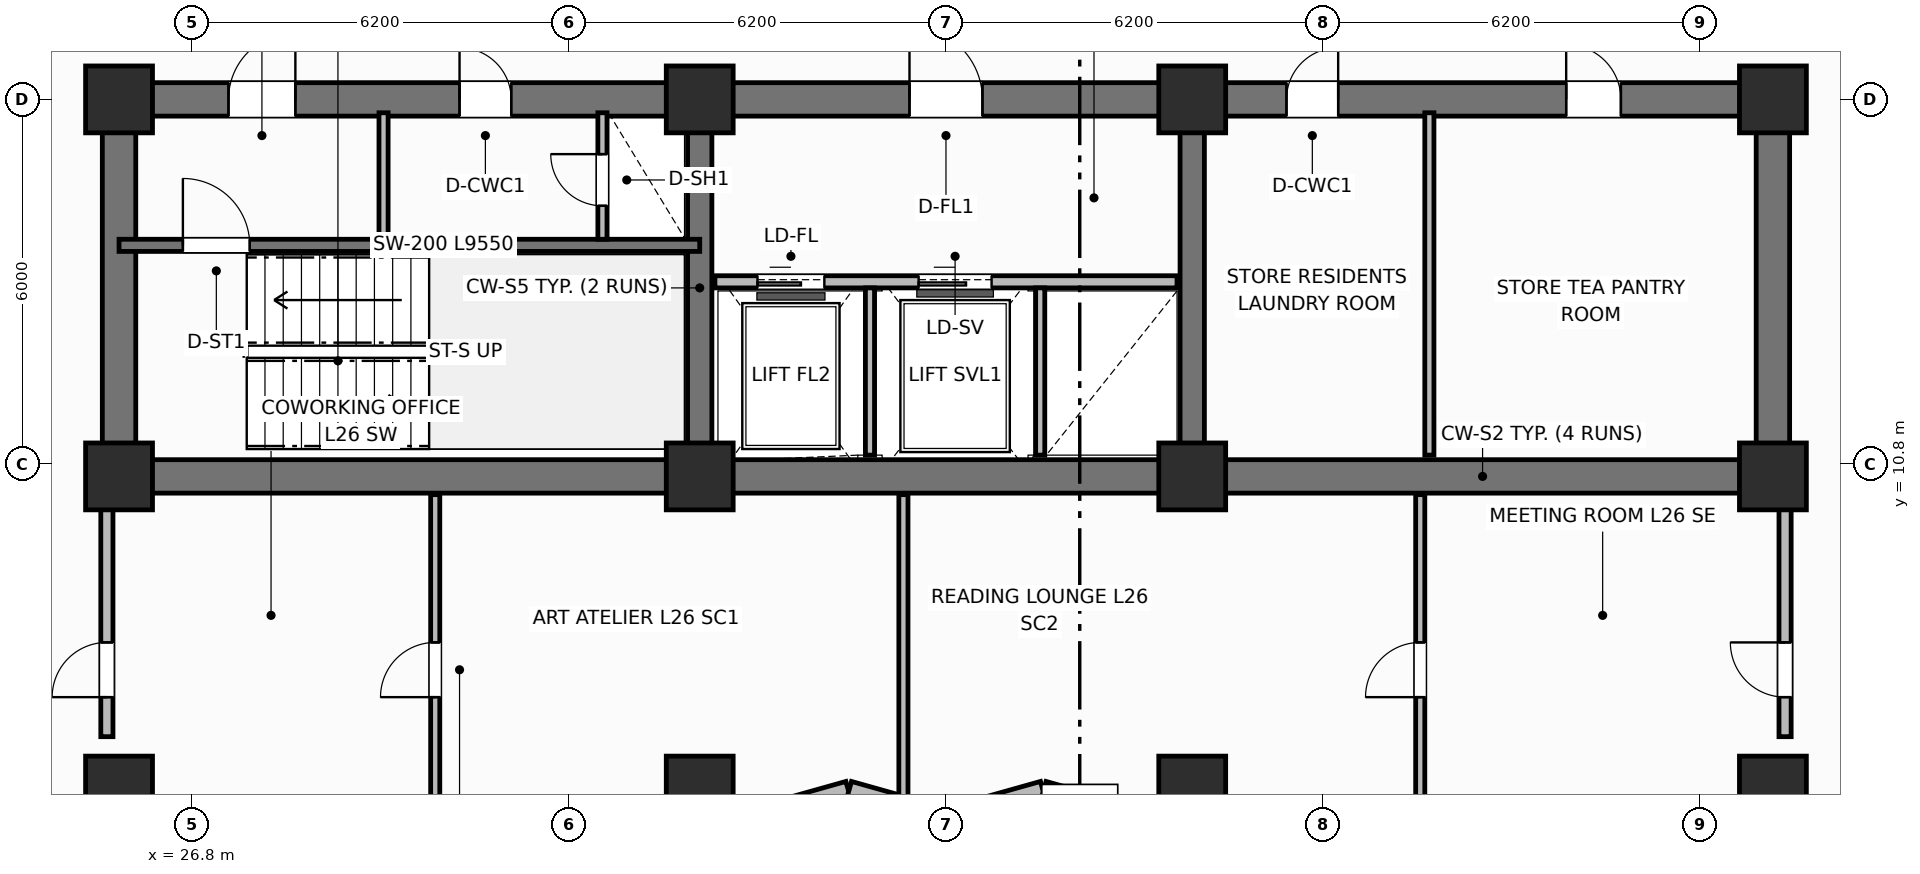
"""IFC4 building model, lengths in metres.
Left out: names, types, materials, properties, quantities, classifications, styles, units other than length and angle.
Written with IfcOpenShell. Run it as: python <this file> out.ifc"""

import sys

from ifc_helpers import new_model, si_unit, direction, frame, frame_2d, origin, origin_2d, place, context, subcontext, project, spatial, rectangle, extrude, element, fill, save


model = new_model("IFC4")
c1 = context("Model", 3, precision=1e-05, world=origin(), true_north=direction((0.0, 1.0)))
c2 = subcontext(c1, "Body", "Model", "MODEL_VIEW")
j1 = project(units=[si_unit("LENGTHUNIT", "METRE"), si_unit("PLANEANGLEUNIT", "RADIAN")], contexts=[c1])
p1 = place(None, origin())
s1 = spatial("IfcSite", under=j1, at=p1, CompositionType="ELEMENT")
p2 = place(p1, origin())
s2 = spatial("IfcBuilding", under=s1, at=p2, CompositionType="ELEMENT")
p3 = place(p2, frame((0.0, 0.0, 106.8)))
s3 = spatial("IfcBuildingStorey", under=s2, at=p3, CompositionType="ELEMENT", Elevation=106.8)
p4 = place(p3, frame((52.8, 10.6, 0.0), z_axis=(0.0, 0.0, 1.0), x_axis=(-1.0, 0.0, 0.0)))
e1 = element("IfcWall", 1, at=p4, inside=s3, PredefinedType="SHEAR", context=c2, shape_type="SweptSolid", body=[
    extrude(rectangle(XDim=27.2, YDim=0.55, at=frame_2d((13.6, 0.0))), origin(), (0.0, 0.0, 1.0), 3.7),
])
for number, where, z_axis, x_axis in (
    (2, (25.6, 10.875, 0.0), (0.0, 0.0, 1.0), (0.0, 1.0, 0.0)),
    (3, (52.8, 10.875, 0.0), (0.0, 0.0, 1.0), (0.0, 1.0, 0.0)),
):
    element("IfcWall", number, at=place(p3, frame(where, z_axis=z_axis, x_axis=x_axis)), inside=s3, PredefinedType="SHEAR", context=c2, shape_type="SweptSolid", body=[
        extrude(rectangle(XDim=5.65, YDim=0.55, at=frame_2d((2.825, 0.0))), origin(), (0.0, 0.0, 1.0), 3.7),
    ])
p5 = place(p3, frame((25.6, 16.8, 0.0), z_axis=(0.0, 0.0, 1.0), x_axis=(1.0, 0.0, 0.0)))
e4 = element("IfcWall", 4, at=p5, inside=s3, PredefinedType="SHEAR", context=c2, shape_type="SweptSolid", body=[
    extrude(rectangle(XDim=27.2, YDim=0.55, at=frame_2d((13.6, 0.0))), origin(), (0.0, 0.0, 1.0), 3.7),
])
p6 = place(p5, frame((1.8, 0.0, 0.0)))
e5 = element("IfcOpeningElement", 5, at=p6, cuts=e4, PredefinedType="OPENING", context=c2, shape_type="SweptSolid", body=[
    extrude(rectangle(XDim=1.1, YDim=2.15, at=frame_2d((0.55, 1.075))), frame((0.0, 0.285, 0.0), z_axis=(0.0, -1.0, 0.0), x_axis=(1.0, 0.0, 0.0)), (0.0, 0.0, 1.0), 0.57),
])
p7 = place(p5, frame((5.6, 0.0, 0.0)))
e6 = element("IfcOpeningElement", 6, at=p7, cuts=e4, PredefinedType="OPENING", context=c2, shape_type="SweptSolid", body=[
    extrude(rectangle(XDim=0.85, YDim=2.1, at=frame_2d((0.425, 1.05))), frame((0.0, 0.285, 0.0), z_axis=(0.0, -1.0, 0.0), x_axis=(1.0, 0.0, 0.0)), (0.0, 0.0, 1.0), 0.57),
])
p8 = place(p5, frame((13.0, 0.0, 0.0)))
e7 = element("IfcOpeningElement", 7, at=p8, cuts=e4, PredefinedType="OPENING", context=c2, shape_type="SweptSolid", body=[
    extrude(rectangle(XDim=1.2, YDim=2.15, at=frame_2d((0.6, 1.075))), frame((0.0, 0.285, 0.0), z_axis=(0.0, -1.0, 0.0), x_axis=(1.0, 0.0, 0.0)), (0.0, 0.0, 1.0), 0.57),
])
p9 = place(p5, frame((19.2, 0.0, 0.0)))
e8 = element("IfcOpeningElement", 8, at=p9, cuts=e4, PredefinedType="OPENING", context=c2, shape_type="SweptSolid", body=[
    extrude(rectangle(XDim=0.85, YDim=2.1, at=frame_2d((0.425, 1.05))), frame((0.0, 0.285, 0.0), z_axis=(0.0, -1.0, 0.0), x_axis=(1.0, 0.0, 0.0)), (0.0, 0.0, 1.0), 0.57),
])
p10 = place(p5, frame((23.8, 0.0, 0.0)))
e9 = element("IfcOpeningElement", 9, at=p10, cuts=e4, PredefinedType="OPENING", context=c2, shape_type="SweptSolid", body=[
    extrude(rectangle(XDim=0.9, YDim=2.1, at=frame_2d((0.45, 1.05))), frame((0.0, 0.285, 0.0), z_axis=(0.0, -1.0, 0.0), x_axis=(1.0, 0.0, 0.0)), (0.0, 0.0, 1.0), 0.57),
])
for number, where, z_axis, x_axis in (
    (10, (35.15, 10.875, 0.0), (0.0, 0.0, 1.0), (0.0, 1.0, 0.0)),
    (11, (43.25, 10.875, 0.0), (0.0, 0.0, 1.0), (0.0, 1.0, 0.0)),
):
    element("IfcWall", number, at=place(p3, frame(where, z_axis=z_axis, x_axis=x_axis)), inside=s3, PredefinedType="SHEAR", context=c2, shape_type="SweptSolid", body=[
        extrude(rectangle(XDim=5.65, YDim=0.4, at=frame_2d((2.825, 0.0))), origin(), (0.0, 0.0, 1.0), 3.7),
    ])
for number, where, z_axis, x_axis in (
    (12, (25.6, 10.6, 0.0), (0.0, 0.0, 1.0), (1.0, 0.0, 0.0)),
    (13, (25.6, 16.8, 0.0), (0.0, 0.0, 1.0), (1.0, 0.0, 0.0)),
    (14, (35.15, 10.6, 0.0), (0.0, 0.0, 1.0), (1.0, 0.0, 0.0)),
    (15, (35.15, 16.8, 0.0), (0.0, 0.0, 1.0), (1.0, 0.0, 0.0)),
    (16, (43.25, 10.6, 0.0), (0.0, 0.0, 1.0), (1.0, 0.0, 0.0)),
    (17, (43.25, 16.8, 0.0), (0.0, 0.0, 1.0), (1.0, 0.0, 0.0)),
    (18, (52.8, 10.6, 0.0), (0.0, 0.0, 1.0), (1.0, 0.0, 0.0)),
    (19, (52.8, 16.8, 0.0), (0.0, 0.0, 1.0), (1.0, 0.0, 0.0)),
    (20, (25.6, 5.45, 0.0), (0.0, 0.0, 1.0), (1.0, 0.0, 0.0)),
    (21, (35.15, 5.45, 0.0), (0.0, 0.0, 1.0), (1.0, 0.0, 0.0)),
    (22, (43.25, 5.45, 0.0), (0.0, 0.0, 1.0), (1.0, 0.0, 0.0)),
    (23, (52.8, 5.45, 0.0), (0.0, 0.0, 1.0), (1.0, 0.0, 0.0)),
):
    element("IfcColumn", number, at=place(p3, frame(where, z_axis=z_axis, x_axis=x_axis)), inside=s3, PredefinedType="COLUMN", context=c2, shape_type="SweptSolid", body=[
        extrude(rectangle(XDim=1.1, YDim=1.1, at=origin_2d()), origin(), (0.0, 0.0, 1.0), 3.7),
    ])
p11 = place(p3, frame((36.0, 4.97, 0.0), z_axis=(0.0, 0.0, 1.0), x_axis=(0.962662902433, 0.270703040766, 0.0)))
e24 = element("IfcWall", 24, at=p11, inside=s3, PredefinedType="SOLIDWALL", context=c2, shape_type="SweptSolid", body=[
    extrude(rectangle(XDim=1.662, YDim=0.34, at=frame_2d((0.831, 0.0))), origin(), (0.0, 0.0, 1.0), 2.7),
])
p12 = place(p3, frame((37.6, 5.42, 0.0), z_axis=(0.0, 0.0, 1.0), x_axis=(0.962652136636, -0.270741322725, 0.0)))
e25 = element("IfcWall", 25, at=p12, inside=s3, PredefinedType="SOLIDWALL", context=c2, shape_type="SweptSolid", body=[
    extrude(rectangle(XDim=1.662, YDim=0.34, at=frame_2d((0.831, 0.0))), origin(), (0.0, 0.0, 1.0), 2.7),
])
p13 = place(p3, frame((39.2, 4.97, 0.0), z_axis=(0.0, 0.0, 1.0), x_axis=(0.962662902433, 0.270703040766, 0.0)))
e26 = element("IfcWall", 26, at=p13, inside=s3, PredefinedType="SOLIDWALL", context=c2, shape_type="SweptSolid", body=[
    extrude(rectangle(XDim=1.662, YDim=0.34, at=frame_2d((0.831, 0.0))), origin(), (0.0, 0.0, 1.0), 2.7),
])
p14 = place(p3, frame((40.8, 5.42, 0.0), z_axis=(0.0, 0.0, 1.0), x_axis=(0.962652136636, -0.270741322725, 0.0)))
e27 = element("IfcWall", 27, at=p14, inside=s3, PredefinedType="SOLIDWALL", context=c2, shape_type="SweptSolid", body=[
    extrude(rectangle(XDim=1.662, YDim=0.34, at=frame_2d((0.831, 0.0))), origin(), (0.0, 0.0, 1.0), 2.7),
])
p15 = place(p3, frame((25.6, 14.4, 0.0), z_axis=(0.0, 0.0, 1.0), x_axis=(1.0, 0.0, 0.0)))
e28 = element("IfcWall", 28, at=p15, inside=s3, PredefinedType="SHEAR", context=c2, shape_type="SweptSolid", body=[
    extrude(rectangle(XDim=9.55, YDim=0.2, at=frame_2d((4.775, 0.0))), origin(), (0.0, 0.0, 1.0), 3.7),
])
p16 = place(p15, frame((1.05, 0.0, 0.0)))
e29 = element("IfcOpeningElement", 29, at=p16, cuts=e28, PredefinedType="OPENING", context=c2, shape_type="SweptSolid", body=[
    extrude(rectangle(XDim=1.1, YDim=2.15, at=frame_2d((0.55, 1.075))), frame((0.0, 0.11, 0.0), z_axis=(0.0, -1.0, 0.0), x_axis=(1.0, 0.0, 0.0)), (0.0, 0.0, 1.0), 0.22),
])
p17 = place(p3, frame((29.95, 14.5, 0.0), z_axis=(0.0, 0.0, 1.0), x_axis=(0.0, 1.0, 0.0)))
e30 = element("IfcWall", 30, at=p17, inside=s3, PredefinedType="PARTITIONING", context=c2, shape_type="SweptSolid", body=[
    extrude(rectangle(XDim=2.08, YDim=0.15, at=frame_2d((1.04, 0.0))), origin(), (0.0, 0.0, 1.0), 2.53),
])
p18 = place(p3, frame((33.55, 14.5, 0.0), z_axis=(0.0, 0.0, 1.0), x_axis=(0.0, 1.0, 0.0)))
e31 = element("IfcWall", 31, at=p18, inside=s3, PredefinedType="PARTITIONING", context=c2, shape_type="SweptSolid", body=[
    extrude(rectangle(XDim=2.08, YDim=0.15, at=frame_2d((1.04, 0.0))), origin(), (0.0, 0.0, 1.0), 2.53),
])
p19 = place(p18, frame((0.55, 0.0, 0.0)))
e32 = element("IfcOpeningElement", 32, at=p19, cuts=e31, PredefinedType="OPENING", context=c2, shape_type="SweptSolid", body=[
    extrude(rectangle(XDim=0.85, YDim=2.05, at=frame_2d((0.425, 1.025))), frame((0.0, 0.085, 0.0), z_axis=(0.0, -1.0, 0.0), x_axis=(1.0, 0.0, 0.0)), (0.0, 0.0, 1.0), 0.17),
])
p20 = place(p3, frame((35.4, 13.8, 0.0), z_axis=(0.0, 0.0, 1.0), x_axis=(1.0, 0.0, 0.0)))
e33 = element("IfcWall", 33, at=p20, inside=s3, PredefinedType="PARTITIONING", context=c2, shape_type="SweptSolid", body=[
    extrude(rectangle(XDim=7.6, YDim=0.2, at=frame_2d((3.8, 0.0))), origin(), (0.0, 0.0, 1.0), 2.3),
])
p21 = place(p20, frame((0.7, 0.0, 0.0)))
e34 = element("IfcOpeningElement", 34, at=p21, cuts=e33, PredefinedType="OPENING", context=c2, shape_type="SweptSolid", body=[
    extrude(rectangle(XDim=1.1, YDim=2.15, at=frame_2d((0.55, 1.075))), frame((0.0, 0.11, 0.0), z_axis=(0.0, -1.0, 0.0), x_axis=(1.0, 0.0, 0.0)), (0.0, 0.0, 1.0), 0.22),
])
p22 = place(p20, frame((3.35, 0.0, 0.0)))
e35 = element("IfcOpeningElement", 35, at=p22, cuts=e33, PredefinedType="OPENING", context=c2, shape_type="SweptSolid", body=[
    extrude(rectangle(XDim=1.2, YDim=2.15, at=frame_2d((0.6, 1.075))), frame((0.0, 0.11, 0.0), z_axis=(0.0, -1.0, 0.0), x_axis=(1.0, 0.0, 0.0)), (0.0, 0.0, 1.0), 0.22),
])
for number, where, z_axis, x_axis in (
    (36, (37.95, 10.95, 0.0), (0.0, 0.0, 1.0), (0.0, 1.0, 0.0)),
    (37, (40.75, 10.95, 0.0), (0.0, 0.0, 1.0), (0.0, 1.0, 0.0)),
):
    element("IfcWall", number, at=place(p3, frame(where, z_axis=z_axis, x_axis=x_axis)), inside=s3, PredefinedType="PARTITIONING", context=c2, shape_type="SweptSolid", body=[
        extrude(rectangle(XDim=2.75, YDim=0.15, at=frame_2d((1.375, 0.0))), origin(), (0.0, 0.0, 1.0), 2.53),
    ])
p23 = place(p3, frame((47.15, 10.95, 0.0), z_axis=(0.0, 0.0, 1.0), x_axis=(0.0, 1.0, 0.0)))
e38 = element("IfcWall", 38, at=p23, inside=s3, PredefinedType="PARTITIONING", context=c2, shape_type="SweptSolid", body=[
    extrude(rectangle(XDim=5.63, YDim=0.15, at=frame_2d((2.815, 0.0))), origin(), (0.0, 0.0, 1.0), 2.53),
])
p24 = place(p3, frame((30.8, 4.97, 0.0), z_axis=(0.0, 0.0, 1.0), x_axis=(0.0, 1.0, 0.0)))
e39 = element("IfcWall", 39, at=p24, inside=s3, PredefinedType="PARTITIONING", context=c2, shape_type="SweptSolid", body=[
    extrude(rectangle(XDim=5.33, YDim=0.15, at=frame_2d((2.665, 0.0))), origin(), (0.0, 0.0, 1.0), 2.53),
])
p25 = place(p24, frame((2.0, 0.0, 0.0)))
e40 = element("IfcOpeningElement", 40, at=p25, cuts=e39, PredefinedType="OPENING", context=c2, shape_type="SweptSolid", body=[
    extrude(rectangle(XDim=0.9, YDim=2.1, at=frame_2d((0.45, 1.05))), frame((0.0, 0.085, 0.0), z_axis=(0.0, -1.0, 0.0), x_axis=(1.0, 0.0, 0.0)), (0.0, 0.0, 1.0), 0.17),
])
p26 = place(p3, frame((38.5, 4.97, 0.0), z_axis=(0.0, 0.0, 1.0), x_axis=(0.0, 1.0, 0.0)))
e41 = element("IfcWall", 41, at=p26, inside=s3, PredefinedType="PARTITIONING", context=c2, shape_type="SweptSolid", body=[
    extrude(rectangle(XDim=5.33, YDim=0.15, at=frame_2d((2.665, 0.0))), origin(), (0.0, 0.0, 1.0), 2.53),
])
p27 = place(p3, frame((47.0, 4.97, 0.0), z_axis=(0.0, 0.0, 1.0), x_axis=(0.0, 1.0, 0.0)))
e42 = element("IfcWall", 42, at=p27, inside=s3, PredefinedType="PARTITIONING", context=c2, shape_type="SweptSolid", body=[
    extrude(rectangle(XDim=5.33, YDim=0.15, at=frame_2d((2.665, 0.0))), origin(), (0.0, 0.0, 1.0), 2.53),
])
p28 = place(p27, frame((2.0, 0.0, 0.0)))
e43 = element("IfcOpeningElement", 43, at=p28, cuts=e42, PredefinedType="OPENING", context=c2, shape_type="SweptSolid", body=[
    extrude(rectangle(XDim=0.9, YDim=2.1, at=frame_2d((0.45, 1.05))), frame((0.0, 0.085, 0.0), z_axis=(0.0, -1.0, 0.0), x_axis=(1.0, 0.0, 0.0)), (0.0, 0.0, 1.0), 0.17),
])
p29 = place(p3, frame((25.4, 6.32, 0.0), z_axis=(0.0, 0.0, 1.0), x_axis=(0.0, 1.0, 0.0)))
e44 = element("IfcWall", 44, at=p29, inside=s3, PredefinedType="PARTITIONING", context=c2, shape_type="SweptSolid", body=[
    extrude(rectangle(XDim=3.98, YDim=0.2, at=frame_2d((1.99, 0.0))), origin(), (0.0, 0.0, 1.0), 2.53),
])
p30 = place(p29, frame((0.65, 0.0, 0.0)))
e45 = element("IfcOpeningElement", 45, at=p30, cuts=e44, PredefinedType="OPENING", context=c2, shape_type="SweptSolid", body=[
    extrude(rectangle(XDim=0.9, YDim=2.1, at=frame_2d((0.45, 1.05))), frame((0.0, 0.11, 0.0), z_axis=(0.0, -1.0, 0.0), x_axis=(1.0, 0.0, 0.0)), (0.0, 0.0, 1.0), 0.22),
])
p31 = place(p3, frame((53.0, 6.32, 0.0), z_axis=(0.0, 0.0, 1.0), x_axis=(0.0, 1.0, 0.0)))
e46 = element("IfcWall", 46, at=p31, inside=s3, PredefinedType="PARTITIONING", context=c2, shape_type="SweptSolid", body=[
    extrude(rectangle(XDim=3.98, YDim=0.2, at=frame_2d((1.99, 0.0))), origin(), (0.0, 0.0, 1.0), 2.53),
])
p32 = place(p31, frame((0.65, 0.0, 0.0)))
e47 = element("IfcOpeningElement", 47, at=p32, cuts=e46, PredefinedType="OPENING", context=c2, shape_type="SweptSolid", body=[
    extrude(rectangle(XDim=0.9, YDim=2.1, at=frame_2d((0.45, 1.05))), frame((0.0, 0.11, 0.0), z_axis=(0.0, -1.0, 0.0), x_axis=(1.0, 0.0, 0.0)), (0.0, 0.0, 1.0), 0.22),
])
p33 = place(p16, origin())
e48 = element("IfcDoor", 48, at=p33, inside=s3, OperationType="SINGLE_SWING_LEFT", PredefinedType="DOOR", context=c2, shape_type="SweptSolid", body=[
    extrude(rectangle(XDim=1.1, YDim=2.15, at=frame_2d((0.55, 1.075))), frame((0.0, 0.025, 0.0), z_axis=(0.0, -1.0, 0.0), x_axis=(1.0, 0.0, 0.0)), (0.0, 0.0, 1.0), 0.05),
])
fill(e29, e48)
p34 = place(p19, origin())
e49 = element("IfcDoor", 49, at=p34, inside=s3, OperationType="SINGLE_SWING_RIGHT", PredefinedType="TRAPDOOR", context=c2, shape_type="SweptSolid", body=[
    extrude(rectangle(XDim=0.85, YDim=2.05, at=frame_2d((0.425, 1.025))), frame((0.0, 0.025, 0.0), z_axis=(0.0, -1.0, 0.0), x_axis=(1.0, 0.0, 0.0)), (0.0, 0.0, 1.0), 0.05),
])
fill(e32, e49)
p35 = place(p21, origin())
e50 = element("IfcDoor", 50, at=p35, inside=s3, OperationType="SLIDING_TO_LEFT", PredefinedType="DOOR", context=c2, shape_type="SweptSolid", body=[
    extrude(rectangle(XDim=1.1, YDim=2.15, at=frame_2d((0.55, 1.075))), frame((0.0, 0.025, 0.0), z_axis=(0.0, -1.0, 0.0), x_axis=(1.0, 0.0, 0.0)), (0.0, 0.0, 1.0), 0.05),
])
fill(e34, e50)
p36 = place(p22, origin())
e51 = element("IfcDoor", 51, at=p36, inside=s3, OperationType="SLIDING_TO_LEFT", PredefinedType="DOOR", context=c2, shape_type="SweptSolid", body=[
    extrude(rectangle(XDim=1.2, YDim=2.15, at=frame_2d((0.6, 1.075))), frame((0.0, 0.025, 0.0), z_axis=(0.0, -1.0, 0.0), x_axis=(1.0, 0.0, 0.0)), (0.0, 0.0, 1.0), 0.05),
])
fill(e35, e51)
p37 = place(p25, origin())
e52 = element("IfcDoor", 52, at=p37, inside=s3, OperationType="SINGLE_SWING_LEFT", PredefinedType="DOOR", context=c2, shape_type="SweptSolid", body=[
    extrude(rectangle(XDim=0.9, YDim=2.1, at=frame_2d((0.45, 1.05))), frame((0.0, 0.025, 0.0), z_axis=(0.0, -1.0, 0.0), x_axis=(1.0, 0.0, 0.0)), (0.0, 0.0, 1.0), 0.05),
])
fill(e40, e52)
p38 = place(p28, origin())
e53 = element("IfcDoor", 53, at=p38, inside=s3, OperationType="SINGLE_SWING_LEFT", PredefinedType="DOOR", context=c2, shape_type="SweptSolid", body=[
    extrude(rectangle(XDim=0.9, YDim=2.1, at=frame_2d((0.45, 1.05))), frame((0.0, 0.025, 0.0), z_axis=(0.0, -1.0, 0.0), x_axis=(1.0, 0.0, 0.0)), (0.0, 0.0, 1.0), 0.05),
])
fill(e43, e53)
p39 = place(p30, origin())
e54 = element("IfcDoor", 54, at=p39, inside=s3, OperationType="SINGLE_SWING_LEFT", PredefinedType="DOOR", context=c2, shape_type="SweptSolid", body=[
    extrude(rectangle(XDim=0.9, YDim=2.1, at=frame_2d((0.45, 1.05))), frame((0.0, 0.025, 0.0), z_axis=(0.0, -1.0, 0.0), x_axis=(1.0, 0.0, 0.0)), (0.0, 0.0, 1.0), 0.05),
])
fill(e45, e54)
p40 = place(p32, origin())
e55 = element("IfcDoor", 55, at=p40, inside=s3, OperationType="SINGLE_SWING_RIGHT", PredefinedType="DOOR", context=c2, shape_type="SweptSolid", body=[
    extrude(rectangle(XDim=0.9, YDim=2.1, at=frame_2d((0.45, 1.05))), frame((0.0, 0.025, 0.0), z_axis=(0.0, -1.0, 0.0), x_axis=(1.0, 0.0, 0.0)), (0.0, 0.0, 1.0), 0.05),
])
fill(e47, e55)
p41 = place(p6, origin())
e56 = element("IfcDoor", 56, at=p41, inside=s3, OperationType="SINGLE_SWING_RIGHT", PredefinedType="DOOR", context=c2, shape_type="SweptSolid", body=[
    extrude(rectangle(XDim=1.1, YDim=2.15, at=frame_2d((0.55, 1.075))), frame((0.0, 0.025, 0.0), z_axis=(0.0, -1.0, 0.0), x_axis=(1.0, 0.0, 0.0)), (0.0, 0.0, 1.0), 0.05),
])
fill(e5, e56)
p42 = place(p7, origin())
e57 = element("IfcDoor", 57, at=p42, inside=s3, OperationType="SINGLE_SWING_LEFT", PredefinedType="DOOR", context=c2, shape_type="SweptSolid", body=[
    extrude(rectangle(XDim=0.85, YDim=2.1, at=frame_2d((0.425, 1.05))), frame((0.0, 0.025, 0.0), z_axis=(0.0, -1.0, 0.0), x_axis=(1.0, 0.0, 0.0)), (0.0, 0.0, 1.0), 0.05),
])
fill(e6, e57)
p43 = place(p8, origin())
e58 = element("IfcDoor", 58, at=p43, inside=s3, OperationType="SINGLE_SWING_LEFT", PredefinedType="DOOR", context=c2, shape_type="SweptSolid", body=[
    extrude(rectangle(XDim=1.2, YDim=2.15, at=frame_2d((0.6, 1.075))), frame((0.0, 0.025, 0.0), z_axis=(0.0, -1.0, 0.0), x_axis=(1.0, 0.0, 0.0)), (0.0, 0.0, 1.0), 0.05),
])
fill(e7, e58)
p44 = place(p9, origin())
e59 = element("IfcDoor", 59, at=p44, inside=s3, OperationType="SINGLE_SWING_RIGHT", PredefinedType="DOOR", context=c2, shape_type="SweptSolid", body=[
    extrude(rectangle(XDim=0.85, YDim=2.1, at=frame_2d((0.425, 1.05))), frame((0.0, 0.025, 0.0), z_axis=(0.0, -1.0, 0.0), x_axis=(1.0, 0.0, 0.0)), (0.0, 0.0, 1.0), 0.05),
])
fill(e8, e59)
p45 = place(p10, origin())
e60 = element("IfcDoor", 60, at=p45, inside=s3, OperationType="SINGLE_SWING_LEFT", PredefinedType="DOOR", context=c2, shape_type="SweptSolid", body=[
    extrude(rectangle(XDim=0.9, YDim=2.1, at=frame_2d((0.45, 1.05))), frame((0.0, 0.025, 0.0), z_axis=(0.0, -1.0, 0.0), x_axis=(1.0, 0.0, 0.0)), (0.0, 0.0, 1.0), 0.05),
])
fill(e9, e60)
save(model, sys.argv[1])
